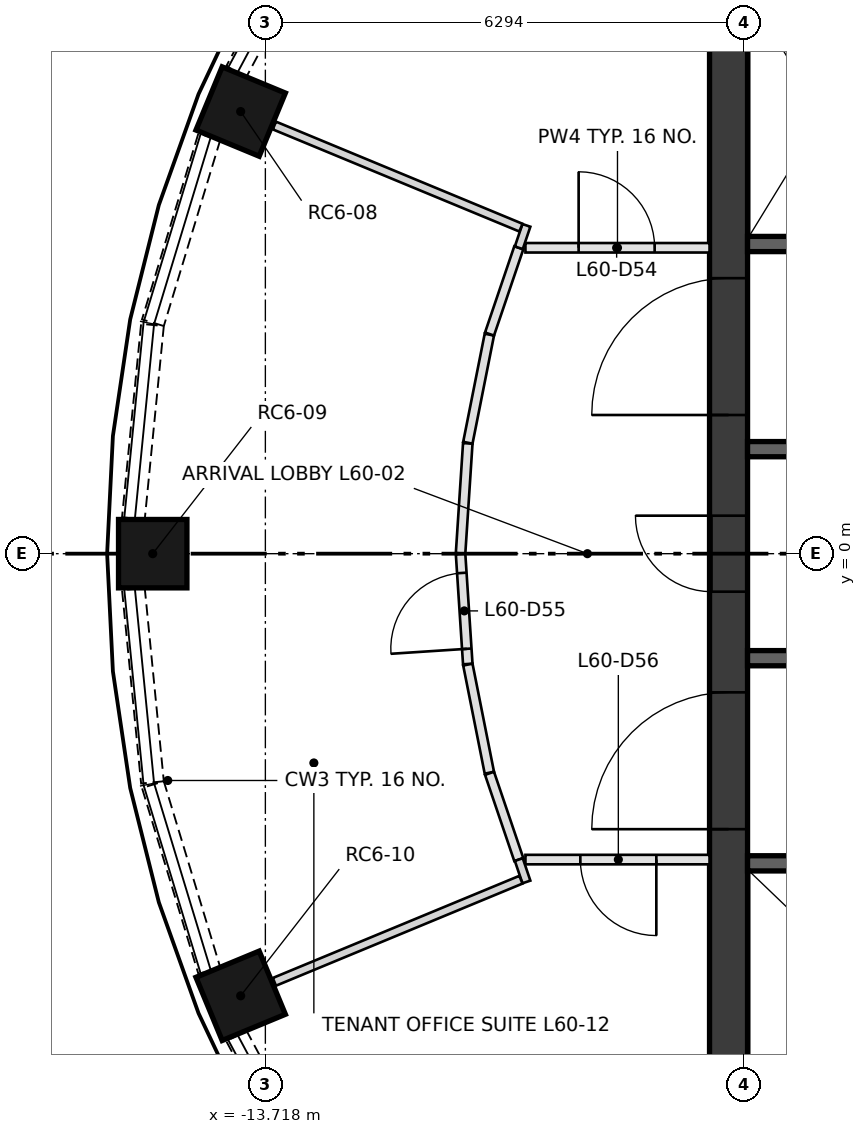
"""IFC4 building model, lengths in metres.
Left out: names, types, materials, properties, quantities, classifications, styles, units other than length and angle.
Written with IfcOpenShell. Run it as: python <this file> out.ifc"""

import sys

from ifc_helpers import new_model, si_unit, direction, frame, frame_2d, origin, origin_2d, place, context, subcontext, project, spatial, rectangle, extrude, element, fill, save


model = new_model("IFC4")
c1 = context("Model", 3, precision=1e-05, world=origin(), true_north=direction((0.0, 1.0)))
c2 = subcontext(c1, "Body", "Model", "MODEL_VIEW")
j1 = project(units=[si_unit("LENGTHUNIT", "METRE"), si_unit("PLANEANGLEUNIT", "RADIAN")], contexts=[c1])
p1 = place(None, origin())
s1 = spatial("IfcSite", under=j1, at=p1, CompositionType="ELEMENT")
p2 = place(p1, origin())
s2 = spatial("IfcBuilding", under=s1, at=p2, CompositionType="ELEMENT")
p3 = place(p2, frame((0.0, 0.0, 221.15)))
s3 = spatial("IfcBuildingStorey", under=s2, at=p3, CompositionType="ELEMENT", Elevation=221.15)
for number, where, z_axis, x_axis in (
    (1, (-14.043, 5.817, 0.0), (0.0, 0.0, 1.0), (-0.924, 0.383, 0.0)),
    (2, (-15.2, 0.0, 0.0), (0.0, 0.0, 1.0), (-1.0, 0.0, 0.0)),
    (3, (-14.043, -5.817, 0.0), (0.0, 0.0, 1.0), (-0.924, -0.383, 0.0)),
):
    element("IfcColumn", number, at=place(p3, frame(where, z_axis=z_axis, x_axis=x_axis)), inside=s3, PredefinedType="COLUMN", context=c2, shape_type="SweptSolid", body=[
        extrude(rectangle(XDim=0.9, YDim=0.9, at=origin_2d()), origin(), (0.0, 0.0, 1.0), 2.85),
    ])
p4 = place(p3, frame((-7.624, -7.374, 0.0), z_axis=(0.0, 0.0, 1.0), x_axis=(0.0, 1.0, 0.0)))
e4 = element("IfcWall", 4, at=p4, inside=s3, PredefinedType="SHEAR", context=c2, shape_type="SweptSolid", body=[
    extrude(rectangle(XDim=14.748, YDim=0.5, at=frame_2d((7.374, 0.0))), origin(), (0.0, 0.0, 1.0), 3.35),
])
p5 = place(p4, frame((6.874, 0.0, 0.0)))
e5 = element("IfcOpeningElement", 5, at=p5, cuts=e4, PredefinedType="OPENING", context=c2, shape_type="SweptSolid", body=[
    extrude(rectangle(XDim=1.0, YDim=2.1, at=frame_2d((0.5, 1.05))), frame((0.0, 0.26, 0.0), z_axis=(0.0, -1.0, 0.0), x_axis=(1.0, 0.0, 0.0)), (0.0, 0.0, 1.0), 0.52),
])
p6 = place(p4, frame((3.75, 0.0, 0.0)))
e6 = element("IfcOpeningElement", 6, at=p6, cuts=e4, PredefinedType="OPENING", context=c2, shape_type="SweptSolid", body=[
    extrude(rectangle(XDim=1.8, YDim=2.1, at=frame_2d((0.9, 1.05))), frame((0.0, 0.26, 0.0), z_axis=(0.0, -1.0, 0.0), x_axis=(1.0, 0.0, 0.0)), (0.0, 0.0, 1.0), 0.52),
])
p7 = place(p4, frame((9.198, 0.0, 0.0)))
e7 = element("IfcOpeningElement", 7, at=p7, cuts=e4, PredefinedType="OPENING", context=c2, shape_type="SweptSolid", body=[
    extrude(rectangle(XDim=1.8, YDim=2.1, at=frame_2d((0.9, 1.05))), frame((0.0, 0.26, 0.0), z_axis=(0.0, -1.0, 0.0), x_axis=(1.0, 0.0, 0.0)), (0.0, 0.0, 1.0), 0.52),
])
p8 = place(p3, frame((-7.374, -4.074, 0.0), z_axis=(0.0, 0.0, 1.0), x_axis=(1.0, 0.0, 0.0)))
e8 = element("IfcWall", 8, at=p8, inside=s3, PredefinedType="SHEAR", context=c2, shape_type="SweptSolid", body=[
    extrude(rectangle(XDim=14.748, YDim=0.2, at=frame_2d((7.374, 0.0))), origin(), (0.0, 0.0, 1.0), 3.0),
])
p9 = place(p8, frame((1.319, 0.0, 0.0)))
e9 = element("IfcOpeningElement", 9, at=p9, cuts=e8, PredefinedType="OPENING", context=c2, shape_type="SweptSolid", body=[
    extrude(rectangle(XDim=1.1, YDim=2.1, at=frame_2d((0.55, 1.05))), frame((0.0, 0.11, 0.0), z_axis=(0.0, -1.0, 0.0), x_axis=(1.0, 0.0, 0.0)), (0.0, 0.0, 1.0), 0.22),
])
p10 = place(p8, frame((4.456, 0.0, 0.0)))
e10 = element("IfcOpeningElement", 10, at=p10, cuts=e8, PredefinedType="OPENING", context=c2, shape_type="SweptSolid", body=[
    extrude(rectangle(XDim=1.1, YDim=2.1, at=frame_2d((0.55, 1.05))), frame((0.0, 0.11, 0.0), z_axis=(0.0, -1.0, 0.0), x_axis=(1.0, 0.0, 0.0)), (0.0, 0.0, 1.0), 0.22),
])
p11 = place(p8, frame((8.143, 0.0, 0.0)))
e11 = element("IfcOpeningElement", 11, at=p11, cuts=e8, PredefinedType="OPENING", context=c2, shape_type="SweptSolid", body=[
    extrude(rectangle(XDim=1.0, YDim=2.1, at=frame_2d((0.5, 1.05))), frame((0.0, 0.11, 0.0), z_axis=(0.0, -1.0, 0.0), x_axis=(1.0, 0.0, 0.0)), (0.0, 0.0, 1.0), 0.22),
])
p12 = place(p8, frame((12.379, 0.0, 0.0)))
e12 = element("IfcOpeningElement", 12, at=p12, cuts=e8, PredefinedType="OPENING", context=c2, shape_type="SweptSolid", body=[
    extrude(rectangle(XDim=0.8, YDim=2.1, at=frame_2d((0.4, 1.05))), frame((0.0, 0.11, 0.0), z_axis=(0.0, -1.0, 0.0), x_axis=(1.0, 0.0, 0.0)), (0.0, 0.0, 1.0), 0.22),
])
p13 = place(p3, frame((-7.374, 4.074, 0.0), z_axis=(0.0, 0.0, 1.0), x_axis=(1.0, 0.0, 0.0)))
e13 = element("IfcWall", 13, at=p13, inside=s3, PredefinedType="SHEAR", context=c2, shape_type="SweptSolid", body=[
    extrude(rectangle(XDim=7.374, YDim=0.2, at=frame_2d((3.687, 0.0))), origin(), (0.0, 0.0, 1.0), 3.0),
])
p14 = place(p13, frame((0.684, 0.0, 0.0)))
e14 = element("IfcOpeningElement", 14, at=p14, cuts=e13, PredefinedType="OPENING", context=c2, shape_type="SweptSolid", body=[
    extrude(rectangle(XDim=1.0, YDim=2.1, at=frame_2d((0.5, 1.05))), frame((0.0, 0.11, 0.0), z_axis=(0.0, -1.0, 0.0), x_axis=(1.0, 0.0, 0.0)), (0.0, 0.0, 1.0), 0.22),
])
p15 = place(p13, frame((2.453, 0.0, 0.0)))
e15 = element("IfcOpeningElement", 15, at=p15, cuts=e13, PredefinedType="OPENING", context=c2, shape_type="SweptSolid", body=[
    extrude(rectangle(XDim=1.0, YDim=2.1, at=frame_2d((0.5, 1.05))), frame((0.0, 0.11, 0.0), z_axis=(0.0, -1.0, 0.0), x_axis=(1.0, 0.0, 0.0)), (0.0, 0.0, 1.0), 0.22),
])
p16 = place(p13, frame((4.221, 0.0, 0.0)))
e16 = element("IfcOpeningElement", 16, at=p16, cuts=e13, PredefinedType="OPENING", context=c2, shape_type="SweptSolid", body=[
    extrude(rectangle(XDim=1.0, YDim=2.1, at=frame_2d((0.5, 1.05))), frame((0.0, 0.11, 0.0), z_axis=(0.0, -1.0, 0.0), x_axis=(1.0, 0.0, 0.0)), (0.0, 0.0, 1.0), 0.22),
])
p17 = place(p13, frame((5.99, 0.0, 0.0)))
e17 = element("IfcOpeningElement", 17, at=p17, cuts=e13, PredefinedType="OPENING", context=c2, shape_type="SweptSolid", body=[
    extrude(rectangle(XDim=1.0, YDim=2.1, at=frame_2d((0.5, 1.05))), frame((0.0, 0.11, 0.0), z_axis=(0.0, -1.0, 0.0), x_axis=(1.0, 0.0, 0.0)), (0.0, 0.0, 1.0), 0.22),
])
for number, where, z_axis, x_axis in (
    (18, (-7.374, -1.375, 0.0), (0.0, 0.0, 1.0), (1.0, 0.0, 0.0)),
    (19, (-7.374, 1.375, 0.0), (0.0, 0.0, 1.0), (1.0, 0.0, 0.0)),
):
    element("IfcWall", number, at=place(p3, frame(where, z_axis=z_axis, x_axis=x_axis)), inside=s3, PredefinedType="SHEAR", context=c2, shape_type="SweptSolid", body=[
        extrude(rectangle(XDim=3.0, YDim=0.2, at=frame_2d((1.5, 0.0))), origin(), (0.0, 0.0, 1.0), 3.0),
    ])
p18 = place(p3, frame((-12.894, 8.598, 0.0), z_axis=(0.0, 0.0, 1.0), x_axis=(-0.471603904468, -0.881810499649, 0.0)))
e20 = element("IfcWall", 20, at=p18, inside=s3, PredefinedType="SOLIDWALL", context=c2, shape_type="SweptSolid", body=[
    extrude(rectangle(XDim=2.557, YDim=0.3, at=frame_2d((1.278, 0.0))), origin(), (0.0, 0.0, 1.0), 0.9),
])
p19 = place(p3, frame((-14.455, 5.486, 0.0), z_axis=(0.0, 0.0, 1.0), x_axis=(-0.290219358397, -0.956960147557, 0.0)))
e21 = element("IfcWall", 21, at=p19, inside=s3, PredefinedType="SOLIDWALL", context=c2, shape_type="SweptSolid", body=[
    extrude(rectangle(XDim=2.557, YDim=0.3, at=frame_2d((1.279, 0.0))), origin(), (0.0, 0.0, 1.0), 0.9),
])
for number, where, z_axis, x_axis in (
    (22, (-15.204, 3.009, 0.0), (0.0, 0.0, 1.0), (-0.098, -0.995, 0.0)),
    (23, (-15.455, -0.464, 0.0), (0.0, 0.0, 1.0), (0.098, -0.995, 0.0)),
):
    element("IfcWall", number, at=place(p3, frame(where, z_axis=z_axis, x_axis=x_axis)), inside=s3, PredefinedType="SOLIDWALL", context=c2, shape_type="SweptSolid", body=[
        extrude(rectangle(XDim=2.558, YDim=0.3, at=frame_2d((1.279, 0.0))), origin(), (0.0, 0.0, 1.0), 0.9),
    ])
p20 = place(p3, frame((-15.198, -3.038, 0.0), z_axis=(0.0, 0.0, 1.0), x_axis=(0.290219358397, -0.956960147557, 0.0)))
e24 = element("IfcWall", 24, at=p20, inside=s3, PredefinedType="SOLIDWALL", context=c2, shape_type="SweptSolid", body=[
    extrude(rectangle(XDim=2.557, YDim=0.3, at=frame_2d((1.279, 0.0))), origin(), (0.0, 0.0, 1.0), 0.9),
])
p21 = place(p3, frame((-14.1, -6.343, 0.0), z_axis=(0.0, 0.0, 1.0), x_axis=(0.471603904468, -0.881810499649, 0.0)))
e25 = element("IfcWall", 25, at=p21, inside=s3, PredefinedType="SOLIDWALL", context=c2, shape_type="SweptSolid", body=[
    extrude(rectangle(XDim=2.557, YDim=0.3, at=frame_2d((1.278, 0.0))), origin(), (0.0, 0.0, 1.0), 0.9),
])
p22 = place(p3, frame((-10.296, 4.024, 0.0), z_axis=(0.0, 0.0, 1.0), x_axis=(1.0, 0.0, 0.0)))
e26 = element("IfcWall", 26, at=p22, inside=s3, PredefinedType="PARTITIONING", context=c2, shape_type="SweptSolid", body=[
    extrude(rectangle(XDim=2.422, YDim=0.125, at=frame_2d((1.211, 0.0))), origin(), (0.0, 0.0, 1.0), 3.0),
])
p23 = place(p22, frame((0.7, 0.0, 0.0)))
e27 = element("IfcOpeningElement", 27, at=p23, cuts=e26, PredefinedType="OPENING", context=c2, shape_type="SweptSolid", body=[
    extrude(rectangle(XDim=1.0, YDim=2.1, at=frame_2d((0.5, 1.05))), frame((0.0, 0.073, 0.0), z_axis=(0.0, -1.0, 0.0), x_axis=(1.0, 0.0, 0.0)), (0.0, 0.0, 1.0), 0.145),
])
p24 = place(p3, frame((-11.15, 0.004, 0.0), z_axis=(0.0, 0.0, 1.0), x_axis=(0.065312343013, 0.997864869534, 0.0)))
e28 = element("IfcWall", 28, at=p24, inside=s3, PredefinedType="PARTITIONING", context=c2, shape_type="SweptSolid", body=[
    extrude(rectangle(XDim=1.45, YDim=0.125, at=frame_2d((0.725, 0.0))), origin(), (0.0, 0.0, 1.0), 3.0),
])
p25 = place(p3, frame((-11.055, -1.451, 0.0), z_axis=(0.0, 0.0, 1.0), x_axis=(-0.065312343013, 0.997864869534, 0.0)))
e29 = element("IfcWall", 29, at=p25, inside=s3, PredefinedType="PARTITIONING", context=c2, shape_type="SweptSolid", body=[
    extrude(rectangle(XDim=1.45, YDim=0.125, at=frame_2d((0.725, 0.0))), origin(), (0.0, 0.0, 1.0), 3.0),
])
p26 = place(p25, frame((0.2, 0.0, 0.0)))
e30 = element("IfcOpeningElement", 30, at=p26, cuts=e29, PredefinedType="OPENING", context=c2, shape_type="SweptSolid", body=[
    extrude(rectangle(XDim=1.0, YDim=2.1, at=frame_2d((0.5, 1.05))), frame((0.0, 0.073, 0.0), z_axis=(0.0, -1.0, 0.0), x_axis=(1.0, 0.0, 0.0)), (0.0, 0.0, 1.0), 0.145),
])
for number, where, z_axis, x_axis in (
    (31, (-11.054, 1.459, 0.0), (0.0, 0.0, 1.0), (0.195, 0.981, 0.0)),
    (32, (-10.771, -2.882, 0.0), (0.0, 0.0, 1.0), (-0.195, 0.981, 0.0)),
):
    element("IfcWall", number, at=place(p3, frame(where, z_axis=z_axis, x_axis=x_axis)), inside=s3, PredefinedType="PARTITIONING", context=c2, shape_type="SweptSolid", body=[
        extrude(rectangle(XDim=1.45, YDim=0.125, at=frame_2d((0.725, 0.0))), origin(), (0.0, 0.0, 1.0), 3.0),
    ])
for number, where, z_axis, x_axis in (
    (33, (-10.769, 2.89, 0.0), (0.0, 0.0, 1.0), (0.321, 0.947, 0.0)),
    (34, (-10.384, -4.024, 0.0), (0.0, 0.0, 1.0), (-0.321, 0.947, 0.0)),
):
    element("IfcWall", number, at=place(p3, frame(where, z_axis=z_axis, x_axis=x_axis)), inside=s3, PredefinedType="PARTITIONING", context=c2, shape_type="SweptSolid", body=[
        extrude(rectangle(XDim=1.198, YDim=0.125, at=frame_2d((0.599, 0.0))), origin(), (0.0, 0.0, 1.0), 3.0),
    ])
p27 = place(p3, frame((-7.874, -4.024, 0.0), z_axis=(0.0, 0.0, 1.0), x_axis=(-1.0, 0.0, 0.0)))
e35 = element("IfcWall", 35, at=p27, inside=s3, PredefinedType="PARTITIONING", context=c2, shape_type="SweptSolid", body=[
    extrude(rectangle(XDim=2.422, YDim=0.125, at=frame_2d((1.211, 0.0))), origin(), (0.0, 0.0, 1.0), 3.0),
])
p28 = place(p27, frame((0.7, 0.0, 0.0)))
e36 = element("IfcOpeningElement", 36, at=p28, cuts=e35, PredefinedType="OPENING", context=c2, shape_type="SweptSolid", body=[
    extrude(rectangle(XDim=1.0, YDim=2.1, at=frame_2d((0.5, 1.05))), frame((0.0, 0.073, 0.0), z_axis=(0.0, -1.0, 0.0), x_axis=(1.0, 0.0, 0.0)), (0.0, 0.0, 1.0), 0.145),
])
p29 = place(p3, frame((-10.384, 4.024, 0.0), z_axis=(0.0, 0.0, 1.0), x_axis=(0.320931919594, 0.947102266382, 0.0)))
e37 = element("IfcWall", 37, at=p29, inside=s3, PredefinedType="PARTITIONING", context=c2, shape_type="SweptSolid", body=[
    extrude(rectangle(XDim=0.311, YDim=0.11, at=frame_2d((0.156, 0.0))), origin(), (0.0, 0.0, 1.0), 3.0),
])
p30 = place(p3, frame((-10.356, 4.289, 0.0), z_axis=(0.0, 0.0, 1.0), x_axis=(-0.923871065891, 0.382703871955, 0.0)))
e38 = element("IfcWall", 38, at=p30, inside=s3, PredefinedType="PARTITIONING", context=c2, shape_type="SweptSolid", body=[
    extrude(rectangle(XDim=3.511, YDim=0.11, at=frame_2d((1.756, 0.0))), origin(), (0.0, 0.0, 1.0), 3.0),
])
p31 = place(p3, frame((-10.384, -4.024, 0.0), z_axis=(0.0, 0.0, 1.0), x_axis=(0.320931919594, -0.947102266382, 0.0)))
e39 = element("IfcWall", 39, at=p31, inside=s3, PredefinedType="PARTITIONING", context=c2, shape_type="SweptSolid", body=[
    extrude(rectangle(XDim=0.311, YDim=0.11, at=frame_2d((0.156, 0.0))), origin(), (0.0, 0.0, 1.0), 3.0),
])
p32 = place(p3, frame((-10.356, -4.289, 0.0), z_axis=(0.0, 0.0, 1.0), x_axis=(-0.923871065891, -0.382703871955, 0.0)))
e40 = element("IfcWall", 40, at=p32, inside=s3, PredefinedType="PARTITIONING", context=c2, shape_type="SweptSolid", body=[
    extrude(rectangle(XDim=3.511, YDim=0.11, at=frame_2d((1.756, 0.0))), origin(), (0.0, 0.0, 1.0), 3.0),
])
p33 = place(p5, origin())
e41 = element("IfcDoor", 41, at=p33, inside=s3, OperationType="SINGLE_SWING_RIGHT", PredefinedType="DOOR", context=c2, shape_type="SweptSolid", body=[
    extrude(rectangle(XDim=1.0, YDim=2.1, at=frame_2d((0.5, 1.05))), frame((0.0, 0.25, 0.0), z_axis=(0.0, -1.0, 0.0), x_axis=(1.0, 0.0, 0.0)), (0.0, 0.0, 1.0), 0.05),
])
fill(e5, e41)
p34 = place(p6, origin())
e42 = element("IfcDoor", 42, at=p34, inside=s3, OperationType="DOUBLE_DOOR_SINGLE_SWING", PredefinedType="DOOR", context=c2, shape_type="SweptSolid", body=[
    extrude(rectangle(XDim=1.8, YDim=2.1, at=frame_2d((0.9, 1.05))), frame((0.0, 0.025, 0.0), z_axis=(0.0, -1.0, 0.0), x_axis=(1.0, 0.0, 0.0)), (0.0, 0.0, 1.0), 0.05),
])
fill(e6, e42)
p35 = place(p7, origin())
e43 = element("IfcDoor", 43, at=p35, inside=s3, OperationType="DOUBLE_DOOR_SINGLE_SWING", PredefinedType="DOOR", context=c2, shape_type="SweptSolid", body=[
    extrude(rectangle(XDim=1.8, YDim=2.1, at=frame_2d((0.9, 1.05))), frame((0.0, 0.025, 0.0), z_axis=(0.0, -1.0, 0.0), x_axis=(1.0, 0.0, 0.0)), (0.0, 0.0, 1.0), 0.05),
])
fill(e7, e43)
p36 = place(p23, origin())
e44 = element("IfcDoor", 44, at=p36, inside=s3, OperationType="SINGLE_SWING_LEFT", PredefinedType="DOOR", context=c2, shape_type="SweptSolid", body=[
    extrude(rectangle(XDim=1.0, YDim=2.1, at=frame_2d((0.5, 1.05))), frame((0.0, 0.025, 0.0), z_axis=(0.0, -1.0, 0.0), x_axis=(1.0, 0.0, 0.0)), (0.0, 0.0, 1.0), 0.05),
])
fill(e27, e44)
p37 = place(p26, origin())
e45 = element("IfcDoor", 45, at=p37, inside=s3, OperationType="SINGLE_SWING_LEFT", PredefinedType="DOOR", context=c2, shape_type="SweptSolid", body=[
    extrude(rectangle(XDim=1.0, YDim=2.1, at=frame_2d((0.5, 1.05))), frame((0.0, 0.025, 0.0), z_axis=(0.0, -1.0, 0.0), x_axis=(1.0, 0.0, 0.0)), (0.0, 0.0, 1.0), 0.05),
])
fill(e30, e45)
p38 = place(p28, origin())
e46 = element("IfcDoor", 46, at=p38, inside=s3, OperationType="SINGLE_SWING_LEFT", PredefinedType="DOOR", context=c2, shape_type="SweptSolid", body=[
    extrude(rectangle(XDim=1.0, YDim=2.1, at=frame_2d((0.5, 1.05))), frame((0.0, 0.025, 0.0), z_axis=(0.0, -1.0, 0.0), x_axis=(1.0, 0.0, 0.0)), (0.0, 0.0, 1.0), 0.05),
])
fill(e36, e46)
save(model, sys.argv[1])
